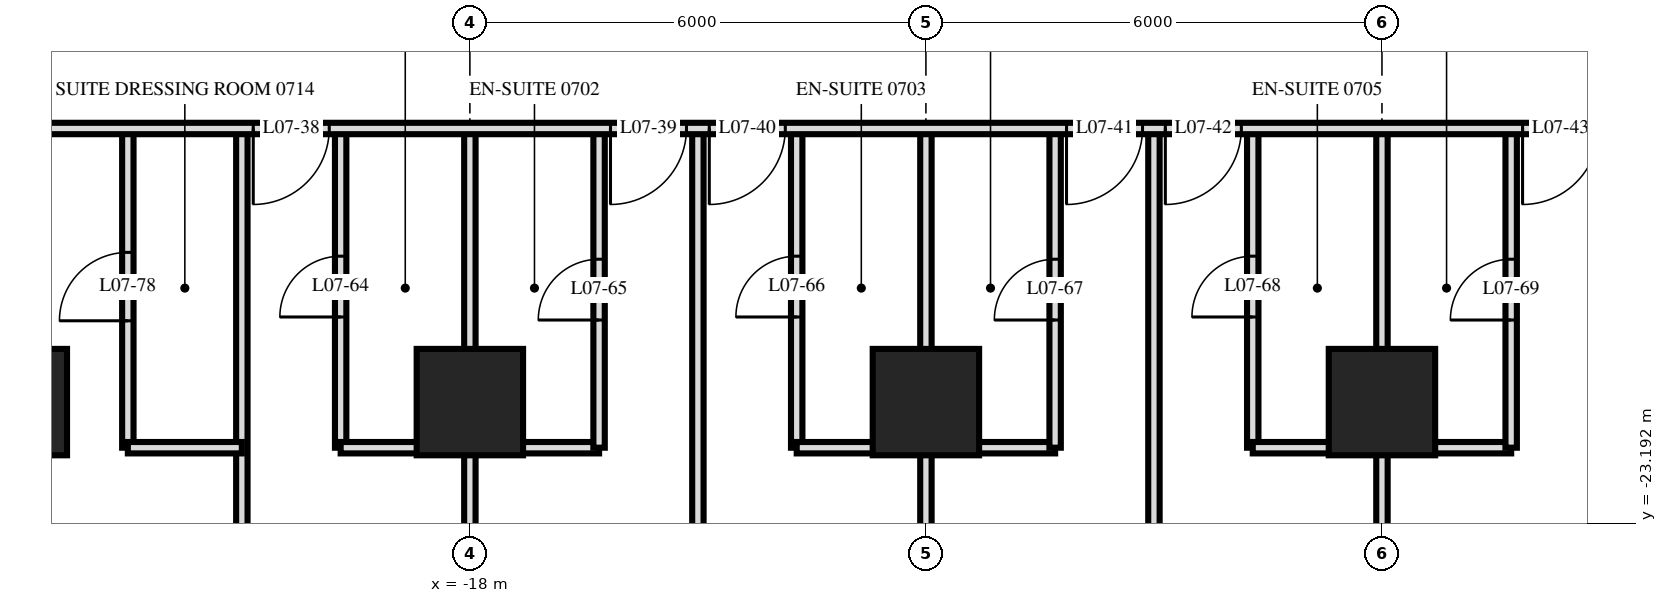
"""IFC4 building model, lengths in metres.
Left out: names, types, materials, properties, quantities, classifications, styles, units other than length and angle.
Written with IfcOpenShell. Run it as: python <this file> out.ifc"""

import sys

from ifc_helpers import new_model, si_unit, direction, frame, frame_2d, origin, origin_2d, place, context, subcontext, project, spatial, rectangle, extrude, element, fill, save


model = new_model("IFC4")
c1 = context("Model", 3, precision=1e-05, world=origin(), true_north=direction((0.0, 1.0)))
c2 = subcontext(c1, "Body", "Model", "MODEL_VIEW")
j1 = project(units=[si_unit("LENGTHUNIT", "METRE"), si_unit("PLANEANGLEUNIT", "RADIAN")], contexts=[c1])
p1 = place(None, origin())
s1 = spatial("IfcSite", under=j1, at=p1, CompositionType="ELEMENT")
p2 = place(p1, origin())
s2 = spatial("IfcBuilding", under=s1, at=p2, CompositionType="ELEMENT")
p3 = place(p2, frame((0.0, 0.0, 34.8)))
s3 = spatial("IfcBuildingStorey", under=s2, at=p3, CompositionType="ELEMENT", Elevation=34.8)
for number, where, z_axis, x_axis in (
    (1, (-24.0, -21.6, 0.0), (0.0, 0.0, 1.0), (1.0, 0.0, 0.0)),
    (2, (-18.0, -21.6, 0.0), (0.0, 0.0, 1.0), (1.0, 0.0, 0.0)),
    (3, (-12.0, -21.6, 0.0), (0.0, 0.0, 1.0), (1.0, 0.0, 0.0)),
    (4, (-6.0, -21.6, 0.0), (0.0, 0.0, 1.0), (1.0, 0.0, 0.0)),
):
    element("IfcColumn", number, at=place(p3, frame(where, z_axis=z_axis, x_axis=x_axis)), inside=s3, PredefinedType="COLUMN", context=c2, shape_type="SweptSolid", body=[
        extrude(rectangle(XDim=1.4, YDim=1.4, at=origin_2d()), origin(), (0.0, 0.0, 1.0), 3.6),
    ])
p4 = place(p3, frame((-4.3, -22.2, 0.0), z_axis=(0.0, 0.0, 1.0), x_axis=(0.0, 1.0, 0.0)))
e5 = element("IfcWall", 5, at=p4, inside=s3, PredefinedType="PARTITIONING", context=c2, shape_type="SweptSolid", body=[
    extrude(rectangle(XDim=4.2, YDim=0.15, at=frame_2d((2.1, 0.0))), origin(), (0.0, 0.0, 1.0), 3.32),
])
p5 = place(p4, frame((1.68, 0.0, 0.0)))
e6 = element("IfcOpeningElement", 6, at=p5, cuts=e5, PredefinedType="OPENING", context=c2, shape_type="SweptSolid", body=[
    extrude(rectangle(XDim=0.8, YDim=2.1, at=frame_2d((0.4, 1.05))), frame((0.0, 0.085, 0.0), z_axis=(0.0, -1.0, 0.0), x_axis=(1.0, 0.0, 0.0)), (0.0, 0.0, 1.0), 0.17),
])
p6 = place(p3, frame((-6.0, -29.22, 0.0), z_axis=(0.0, 0.0, 1.0), x_axis=(0.0, 1.0, 0.0)))
e7 = element("IfcWall", 7, at=p6, inside=s3, PredefinedType="PARTITIONING", context=c2, shape_type="SweptSolid", body=[
    extrude(rectangle(XDim=11.22, YDim=0.15, at=frame_2d((5.61, 0.0))), origin(), (0.0, 0.0, 1.0), 3.32),
])
p7 = place(p3, frame((-7.7, -22.2, 0.0), z_axis=(0.0, 0.0, 1.0), x_axis=(0.0, 1.0, 0.0)))
e8 = element("IfcWall", 8, at=p7, inside=s3, PredefinedType="PARTITIONING", context=c2, shape_type="SweptSolid", body=[
    extrude(rectangle(XDim=4.2, YDim=0.15, at=frame_2d((2.1, 0.0))), origin(), (0.0, 0.0, 1.0), 3.32),
])
p8 = place(p7, frame((1.72, 0.0, 0.0)))
e9 = element("IfcOpeningElement", 9, at=p8, cuts=e8, PredefinedType="OPENING", context=c2, shape_type="SweptSolid", body=[
    extrude(rectangle(XDim=0.8, YDim=2.1, at=frame_2d((0.4, 1.05))), frame((0.0, 0.085, 0.0), z_axis=(0.0, -1.0, 0.0), x_axis=(1.0, 0.0, 0.0)), (0.0, 0.0, 1.0), 0.17),
])
p9 = place(p3, frame((-9.0, -29.22, 0.0), z_axis=(0.0, 0.0, 1.0), x_axis=(0.0, 1.0, 0.0)))
e10 = element("IfcWall", 10, at=p9, inside=s3, PredefinedType="PARTITIONING", context=c2, shape_type="SweptSolid", body=[
    extrude(rectangle(XDim=11.22, YDim=0.15, at=frame_2d((5.61, 0.0))), origin(), (0.0, 0.0, 1.0), 3.32),
])
p10 = place(p3, frame((-10.3, -22.2, 0.0), z_axis=(0.0, 0.0, 1.0), x_axis=(0.0, 1.0, 0.0)))
e11 = element("IfcWall", 11, at=p10, inside=s3, PredefinedType="PARTITIONING", context=c2, shape_type="SweptSolid", body=[
    extrude(rectangle(XDim=4.2, YDim=0.15, at=frame_2d((2.1, 0.0))), origin(), (0.0, 0.0, 1.0), 3.32),
])
p11 = place(p10, frame((1.68, 0.0, 0.0)))
e12 = element("IfcOpeningElement", 12, at=p11, cuts=e11, PredefinedType="OPENING", context=c2, shape_type="SweptSolid", body=[
    extrude(rectangle(XDim=0.8, YDim=2.1, at=frame_2d((0.4, 1.05))), frame((0.0, 0.085, 0.0), z_axis=(0.0, -1.0, 0.0), x_axis=(1.0, 0.0, 0.0)), (0.0, 0.0, 1.0), 0.17),
])
p12 = place(p3, frame((-12.0, -29.22, 0.0), z_axis=(0.0, 0.0, 1.0), x_axis=(0.0, 1.0, 0.0)))
e13 = element("IfcWall", 13, at=p12, inside=s3, PredefinedType="PARTITIONING", context=c2, shape_type="SweptSolid", body=[
    extrude(rectangle(XDim=11.22, YDim=0.15, at=frame_2d((5.61, 0.0))), origin(), (0.0, 0.0, 1.0), 3.32),
])
p13 = place(p3, frame((-13.7, -22.2, 0.0), z_axis=(0.0, 0.0, 1.0), x_axis=(0.0, 1.0, 0.0)))
e14 = element("IfcWall", 14, at=p13, inside=s3, PredefinedType="PARTITIONING", context=c2, shape_type="SweptSolid", body=[
    extrude(rectangle(XDim=4.2, YDim=0.15, at=frame_2d((2.1, 0.0))), origin(), (0.0, 0.0, 1.0), 3.32),
])
p14 = place(p13, frame((1.72, 0.0, 0.0)))
e15 = element("IfcOpeningElement", 15, at=p14, cuts=e14, PredefinedType="OPENING", context=c2, shape_type="SweptSolid", body=[
    extrude(rectangle(XDim=0.8, YDim=2.1, at=frame_2d((0.4, 1.05))), frame((0.0, 0.085, 0.0), z_axis=(0.0, -1.0, 0.0), x_axis=(1.0, 0.0, 0.0)), (0.0, 0.0, 1.0), 0.17),
])
p15 = place(p3, frame((-15.0, -29.22, 0.0), z_axis=(0.0, 0.0, 1.0), x_axis=(0.0, 1.0, 0.0)))
e16 = element("IfcWall", 16, at=p15, inside=s3, PredefinedType="PARTITIONING", context=c2, shape_type="SweptSolid", body=[
    extrude(rectangle(XDim=11.22, YDim=0.15, at=frame_2d((5.61, 0.0))), origin(), (0.0, 0.0, 1.0), 3.32),
])
p16 = place(p3, frame((-16.3, -22.2, 0.0), z_axis=(0.0, 0.0, 1.0), x_axis=(0.0, 1.0, 0.0)))
e17 = element("IfcWall", 17, at=p16, inside=s3, PredefinedType="PARTITIONING", context=c2, shape_type="SweptSolid", body=[
    extrude(rectangle(XDim=4.2, YDim=0.15, at=frame_2d((2.1, 0.0))), origin(), (0.0, 0.0, 1.0), 3.32),
])
p17 = place(p16, frame((1.68, 0.0, 0.0)))
e18 = element("IfcOpeningElement", 18, at=p17, cuts=e17, PredefinedType="OPENING", context=c2, shape_type="SweptSolid", body=[
    extrude(rectangle(XDim=0.8, YDim=2.1, at=frame_2d((0.4, 1.05))), frame((0.0, 0.085, 0.0), z_axis=(0.0, -1.0, 0.0), x_axis=(1.0, 0.0, 0.0)), (0.0, 0.0, 1.0), 0.17),
])
p18 = place(p3, frame((-18.0, -29.22, 0.0), z_axis=(0.0, 0.0, 1.0), x_axis=(0.0, 1.0, 0.0)))
e19 = element("IfcWall", 19, at=p18, inside=s3, PredefinedType="PARTITIONING", context=c2, shape_type="SweptSolid", body=[
    extrude(rectangle(XDim=11.22, YDim=0.15, at=frame_2d((5.61, 0.0))), origin(), (0.0, 0.0, 1.0), 3.32),
])
p19 = place(p3, frame((-19.7, -22.2, 0.0), z_axis=(0.0, 0.0, 1.0), x_axis=(0.0, 1.0, 0.0)))
e20 = element("IfcWall", 20, at=p19, inside=s3, PredefinedType="PARTITIONING", context=c2, shape_type="SweptSolid", body=[
    extrude(rectangle(XDim=4.2, YDim=0.15, at=frame_2d((2.1, 0.0))), origin(), (0.0, 0.0, 1.0), 3.32),
])
p20 = place(p19, frame((1.72, 0.0, 0.0)))
e21 = element("IfcOpeningElement", 21, at=p20, cuts=e20, PredefinedType="OPENING", context=c2, shape_type="SweptSolid", body=[
    extrude(rectangle(XDim=0.8, YDim=2.1, at=frame_2d((0.4, 1.05))), frame((0.0, 0.085, 0.0), z_axis=(0.0, -1.0, 0.0), x_axis=(1.0, 0.0, 0.0)), (0.0, 0.0, 1.0), 0.17),
])
p21 = place(p3, frame((-21.0, -29.22, 0.0), z_axis=(0.0, 0.0, 1.0), x_axis=(0.0, 1.0, 0.0)))
e22 = element("IfcWall", 22, at=p21, inside=s3, PredefinedType="PARTITIONING", context=c2, shape_type="SweptSolid", body=[
    extrude(rectangle(XDim=11.22, YDim=0.15, at=frame_2d((5.61, 0.0))), origin(), (0.0, 0.0, 1.0), 3.32),
])
p22 = place(p3, frame((-22.5, -22.2, 0.0), z_axis=(0.0, 0.0, 1.0), x_axis=(0.0, 1.0, 0.0)))
e23 = element("IfcWall", 23, at=p22, inside=s3, PredefinedType="PARTITIONING", context=c2, shape_type="SweptSolid", body=[
    extrude(rectangle(XDim=4.2, YDim=0.15, at=frame_2d((2.1, 0.0))), origin(), (0.0, 0.0, 1.0), 3.32),
])
p23 = place(p22, frame((1.67, 0.0, 0.0)))
e24 = element("IfcOpeningElement", 24, at=p23, cuts=e23, PredefinedType="OPENING", context=c2, shape_type="SweptSolid", body=[
    extrude(rectangle(XDim=0.9, YDim=2.1, at=frame_2d((0.45, 1.05))), frame((0.0, 0.085, 0.0), z_axis=(0.0, -1.0, 0.0), x_axis=(1.0, 0.0, 0.0)), (0.0, 0.0, 1.0), 0.17),
])
p24 = place(p3, frame((-22.5, -22.2, 0.0), z_axis=(0.0, 0.0, 1.0), x_axis=(1.0, 0.0, 0.0)))
e25 = element("IfcWall", 25, at=p24, inside=s3, PredefinedType="PARTITIONING", context=c2, shape_type="SweptSolid", body=[
    extrude(rectangle(XDim=1.5, YDim=0.15, at=frame_2d((0.75, 0.0))), origin(), (0.0, 0.0, 1.0), 3.32),
])
for number, where, z_axis, x_axis in (
    (26, (-19.7, -22.2, 0.0), (0.0, 0.0, 1.0), (1.0, 0.0, 0.0)),
    (27, (-13.7, -22.2, 0.0), (0.0, 0.0, 1.0), (1.0, 0.0, 0.0)),
    (28, (-7.7, -22.2, 0.0), (0.0, 0.0, 1.0), (1.0, 0.0, 0.0)),
):
    element("IfcWall", number, at=place(p3, frame(where, z_axis=z_axis, x_axis=x_axis)), inside=s3, PredefinedType="PARTITIONING", context=c2, shape_type="SweptSolid", body=[
        extrude(rectangle(XDim=3.4, YDim=0.15, at=frame_2d((1.7, 0.0))), origin(), (0.0, 0.0, 1.0), 3.32),
    ])
p25 = place(p3, frame((-33.12, -18.0, 0.0), z_axis=(0.0, 0.0, 1.0), x_axis=(1.0, 0.0, 0.0)))
e29 = element("IfcWall", 29, at=p25, inside=s3, PredefinedType="PARTITIONING", context=c2, shape_type="SweptSolid", body=[
    extrude(rectangle(XDim=66.24, YDim=0.15, at=frame_2d((33.12, 0.0))), origin(), (0.0, 0.0, 1.0), 3.32),
])
p26 = place(p25, frame((12.27, 0.0, 0.0)))
e30 = element("IfcOpeningElement", 30, at=p26, cuts=e29, PredefinedType="OPENING", context=c2, shape_type="SweptSolid", body=[
    extrude(rectangle(XDim=1.0, YDim=2.1, at=frame_2d((0.5, 1.05))), frame((0.0, 0.085, 0.0), z_axis=(0.0, -1.0, 0.0), x_axis=(1.0, 0.0, 0.0)), (0.0, 0.0, 1.0), 0.17),
])
p27 = place(p25, frame((16.97, 0.0, 0.0)))
e31 = element("IfcOpeningElement", 31, at=p27, cuts=e29, PredefinedType="OPENING", context=c2, shape_type="SweptSolid", body=[
    extrude(rectangle(XDim=1.0, YDim=2.1, at=frame_2d((0.5, 1.05))), frame((0.0, 0.085, 0.0), z_axis=(0.0, -1.0, 0.0), x_axis=(1.0, 0.0, 0.0)), (0.0, 0.0, 1.0), 0.17),
])
p28 = place(p25, frame((18.27, 0.0, 0.0)))
e32 = element("IfcOpeningElement", 32, at=p28, cuts=e29, PredefinedType="OPENING", context=c2, shape_type="SweptSolid", body=[
    extrude(rectangle(XDim=1.0, YDim=2.1, at=frame_2d((0.5, 1.05))), frame((0.0, 0.085, 0.0), z_axis=(0.0, -1.0, 0.0), x_axis=(1.0, 0.0, 0.0)), (0.0, 0.0, 1.0), 0.17),
])
p29 = place(p25, frame((22.97, 0.0, 0.0)))
e33 = element("IfcOpeningElement", 33, at=p29, cuts=e29, PredefinedType="OPENING", context=c2, shape_type="SweptSolid", body=[
    extrude(rectangle(XDim=1.0, YDim=2.1, at=frame_2d((0.5, 1.05))), frame((0.0, 0.085, 0.0), z_axis=(0.0, -1.0, 0.0), x_axis=(1.0, 0.0, 0.0)), (0.0, 0.0, 1.0), 0.17),
])
p30 = place(p25, frame((24.27, 0.0, 0.0)))
e34 = element("IfcOpeningElement", 34, at=p30, cuts=e29, PredefinedType="OPENING", context=c2, shape_type="SweptSolid", body=[
    extrude(rectangle(XDim=1.0, YDim=2.1, at=frame_2d((0.5, 1.05))), frame((0.0, 0.085, 0.0), z_axis=(0.0, -1.0, 0.0), x_axis=(1.0, 0.0, 0.0)), (0.0, 0.0, 1.0), 0.17),
])
p31 = place(p25, frame((28.97, 0.0, 0.0)))
e35 = element("IfcOpeningElement", 35, at=p31, cuts=e29, PredefinedType="OPENING", context=c2, shape_type="SweptSolid", body=[
    extrude(rectangle(XDim=1.0, YDim=2.1, at=frame_2d((0.5, 1.05))), frame((0.0, 0.085, 0.0), z_axis=(0.0, -1.0, 0.0), x_axis=(1.0, 0.0, 0.0)), (0.0, 0.0, 1.0), 0.17),
])
p32 = place(p25, frame((30.27, 0.0, 0.0)))
e36 = element("IfcOpeningElement", 36, at=p32, cuts=e29, PredefinedType="OPENING", context=c2, shape_type="SweptSolid", body=[
    extrude(rectangle(XDim=1.0, YDim=2.1, at=frame_2d((0.5, 1.05))), frame((0.0, 0.085, 0.0), z_axis=(0.0, -1.0, 0.0), x_axis=(1.0, 0.0, 0.0)), (0.0, 0.0, 1.0), 0.17),
])
p33 = place(p25, frame((34.97, 0.0, 0.0)))
e37 = element("IfcOpeningElement", 37, at=p33, cuts=e29, PredefinedType="OPENING", context=c2, shape_type="SweptSolid", body=[
    extrude(rectangle(XDim=1.0, YDim=2.1, at=frame_2d((0.5, 1.05))), frame((0.0, 0.085, 0.0), z_axis=(0.0, -1.0, 0.0), x_axis=(1.0, 0.0, 0.0)), (0.0, 0.0, 1.0), 0.17),
])
p34 = place(p25, frame((37.27, 0.0, 0.0)))
e38 = element("IfcOpeningElement", 38, at=p34, cuts=e29, PredefinedType="OPENING", context=c2, shape_type="SweptSolid", body=[
    extrude(rectangle(XDim=1.0, YDim=2.1, at=frame_2d((0.5, 1.05))), frame((0.0, 0.085, 0.0), z_axis=(0.0, -1.0, 0.0), x_axis=(1.0, 0.0, 0.0)), (0.0, 0.0, 1.0), 0.17),
])
p35 = place(p25, frame((43.97, 0.0, 0.0)))
e39 = element("IfcOpeningElement", 39, at=p35, cuts=e29, PredefinedType="OPENING", context=c2, shape_type="SweptSolid", body=[
    extrude(rectangle(XDim=1.0, YDim=2.1, at=frame_2d((0.5, 1.05))), frame((0.0, 0.085, 0.0), z_axis=(0.0, -1.0, 0.0), x_axis=(1.0, 0.0, 0.0)), (0.0, 0.0, 1.0), 0.17),
])
p36 = place(p25, frame((45.27, 0.0, 0.0)))
e40 = element("IfcOpeningElement", 40, at=p36, cuts=e29, PredefinedType="OPENING", context=c2, shape_type="SweptSolid", body=[
    extrude(rectangle(XDim=1.0, YDim=2.1, at=frame_2d((0.5, 1.05))), frame((0.0, 0.085, 0.0), z_axis=(0.0, -1.0, 0.0), x_axis=(1.0, 0.0, 0.0)), (0.0, 0.0, 1.0), 0.17),
])
p37 = place(p25, frame((51.22, 0.0, 0.0)))
e41 = element("IfcOpeningElement", 41, at=p37, cuts=e29, PredefinedType="OPENING", context=c2, shape_type="SweptSolid", body=[
    extrude(rectangle(XDim=1.0, YDim=2.1, at=frame_2d((0.5, 1.05))), frame((0.0, 0.085, 0.0), z_axis=(0.0, -1.0, 0.0), x_axis=(1.0, 0.0, 0.0)), (0.0, 0.0, 1.0), 0.17),
])
p38 = place(p25, frame((54.27, 0.0, 0.0)))
e42 = element("IfcOpeningElement", 42, at=p38, cuts=e29, PredefinedType="OPENING", context=c2, shape_type="SweptSolid", body=[
    extrude(rectangle(XDim=1.0, YDim=2.1, at=frame_2d((0.5, 1.05))), frame((0.0, 0.085, 0.0), z_axis=(0.0, -1.0, 0.0), x_axis=(1.0, 0.0, 0.0)), (0.0, 0.0, 1.0), 0.17),
])
p39 = place(p25, frame((6.07, 0.0, 0.0)))
e43 = element("IfcOpeningElement", 43, at=p39, cuts=e29, PredefinedType="OPENING", context=c2, shape_type="SweptSolid", body=[
    extrude(rectangle(XDim=1.0, YDim=2.1, at=frame_2d((0.5, 1.05))), frame((0.0, 0.085, 0.0), z_axis=(0.0, -1.0, 0.0), x_axis=(1.0, 0.0, 0.0)), (0.0, 0.0, 1.0), 0.17),
])
p40 = place(p25, frame((63.37, 0.0, 0.0)))
e44 = element("IfcOpeningElement", 44, at=p40, cuts=e29, PredefinedType="OPENING", context=c2, shape_type="SweptSolid", body=[
    extrude(rectangle(XDim=1.0, YDim=2.1, at=frame_2d((0.5, 1.05))), frame((0.0, 0.085, 0.0), z_axis=(0.0, -1.0, 0.0), x_axis=(1.0, 0.0, 0.0)), (0.0, 0.0, 1.0), 0.17),
])
p41 = place(p26, frame((0.5, 0.0, 0.0), z_axis=(0.0, 0.0, 1.0), x_axis=(-1.0, 0.0, 0.0)))
e45 = element("IfcDoor", 45, at=p41, inside=s3, OperationType="SINGLE_SWING_LEFT", PredefinedType="DOOR", context=c2, shape_type="SweptSolid", body=[
    extrude(rectangle(XDim=1.0, YDim=2.1, at=frame_2d((0.0, 1.05))), frame((0.0, -0.025, 0.0), z_axis=(0.0, 1.0, 0.0), x_axis=(-1.0, 0.0, 0.0)), (0.0, 0.0, 1.0), 0.05),
])
fill(e30, e45)
p42 = place(p27, frame((0.5, 0.0, 0.0), z_axis=(0.0, 0.0, 1.0), x_axis=(-1.0, 0.0, 0.0)))
e46 = element("IfcDoor", 46, at=p42, inside=s3, OperationType="SINGLE_SWING_LEFT", PredefinedType="DOOR", context=c2, shape_type="SweptSolid", body=[
    extrude(rectangle(XDim=1.0, YDim=2.1, at=frame_2d((0.0, 1.05))), frame((0.0, -0.025, 0.0), z_axis=(0.0, 1.0, 0.0), x_axis=(-1.0, 0.0, 0.0)), (0.0, 0.0, 1.0), 0.05),
])
fill(e31, e46)
p43 = place(p28, frame((0.5, 0.0, 0.0), z_axis=(0.0, 0.0, 1.0), x_axis=(-1.0, 0.0, 0.0)))
e47 = element("IfcDoor", 47, at=p43, inside=s3, OperationType="SINGLE_SWING_LEFT", PredefinedType="DOOR", context=c2, shape_type="SweptSolid", body=[
    extrude(rectangle(XDim=1.0, YDim=2.1, at=frame_2d((0.0, 1.05))), frame((0.0, -0.025, 0.0), z_axis=(0.0, 1.0, 0.0), x_axis=(-1.0, 0.0, 0.0)), (0.0, 0.0, 1.0), 0.05),
])
fill(e32, e47)
p44 = place(p29, frame((0.5, 0.0, 0.0), z_axis=(0.0, 0.0, 1.0), x_axis=(-1.0, 0.0, 0.0)))
e48 = element("IfcDoor", 48, at=p44, inside=s3, OperationType="SINGLE_SWING_LEFT", PredefinedType="DOOR", context=c2, shape_type="SweptSolid", body=[
    extrude(rectangle(XDim=1.0, YDim=2.1, at=frame_2d((0.0, 1.05))), frame((0.0, -0.025, 0.0), z_axis=(0.0, 1.0, 0.0), x_axis=(-1.0, 0.0, 0.0)), (0.0, 0.0, 1.0), 0.05),
])
fill(e33, e48)
p45 = place(p30, frame((0.5, 0.0, 0.0), z_axis=(0.0, 0.0, 1.0), x_axis=(-1.0, 0.0, 0.0)))
e49 = element("IfcDoor", 49, at=p45, inside=s3, OperationType="SINGLE_SWING_LEFT", PredefinedType="DOOR", context=c2, shape_type="SweptSolid", body=[
    extrude(rectangle(XDim=1.0, YDim=2.1, at=frame_2d((0.0, 1.05))), frame((0.0, -0.025, 0.0), z_axis=(0.0, 1.0, 0.0), x_axis=(-1.0, 0.0, 0.0)), (0.0, 0.0, 1.0), 0.05),
])
fill(e34, e49)
p46 = place(p31, frame((0.5, 0.0, 0.0), z_axis=(0.0, 0.0, 1.0), x_axis=(-1.0, 0.0, 0.0)))
e50 = element("IfcDoor", 50, at=p46, inside=s3, OperationType="SINGLE_SWING_LEFT", PredefinedType="DOOR", context=c2, shape_type="SweptSolid", body=[
    extrude(rectangle(XDim=1.0, YDim=2.1, at=frame_2d((0.0, 1.05))), frame((0.0, -0.025, 0.0), z_axis=(0.0, 1.0, 0.0), x_axis=(-1.0, 0.0, 0.0)), (0.0, 0.0, 1.0), 0.05),
])
fill(e35, e50)
p47 = place(p20, origin())
e51 = element("IfcDoor", 51, at=p47, inside=s3, OperationType="SINGLE_SWING_RIGHT", PredefinedType="DOOR", context=c2, shape_type="SweptSolid", body=[
    extrude(rectangle(XDim=0.8, YDim=2.1, at=frame_2d((0.4, 1.05))), frame((0.0, 0.025, 0.0), z_axis=(0.0, -1.0, 0.0), x_axis=(1.0, 0.0, 0.0)), (0.0, 0.0, 1.0), 0.05),
])
fill(e21, e51)
p48 = place(p17, origin())
e52 = element("IfcDoor", 52, at=p48, inside=s3, OperationType="SINGLE_SWING_RIGHT", PredefinedType="DOOR", context=c2, shape_type="SweptSolid", body=[
    extrude(rectangle(XDim=0.8, YDim=2.1, at=frame_2d((0.4, 1.05))), frame((0.0, 0.025, 0.0), z_axis=(0.0, -1.0, 0.0), x_axis=(1.0, 0.0, 0.0)), (0.0, 0.0, 1.0), 0.05),
])
fill(e18, e52)
p49 = place(p14, origin())
e53 = element("IfcDoor", 53, at=p49, inside=s3, OperationType="SINGLE_SWING_RIGHT", PredefinedType="DOOR", context=c2, shape_type="SweptSolid", body=[
    extrude(rectangle(XDim=0.8, YDim=2.1, at=frame_2d((0.4, 1.05))), frame((0.0, 0.025, 0.0), z_axis=(0.0, -1.0, 0.0), x_axis=(1.0, 0.0, 0.0)), (0.0, 0.0, 1.0), 0.05),
])
fill(e15, e53)
p50 = place(p11, origin())
e54 = element("IfcDoor", 54, at=p50, inside=s3, OperationType="SINGLE_SWING_RIGHT", PredefinedType="DOOR", context=c2, shape_type="SweptSolid", body=[
    extrude(rectangle(XDim=0.8, YDim=2.1, at=frame_2d((0.4, 1.05))), frame((0.0, 0.025, 0.0), z_axis=(0.0, -1.0, 0.0), x_axis=(1.0, 0.0, 0.0)), (0.0, 0.0, 1.0), 0.05),
])
fill(e12, e54)
p51 = place(p8, origin())
e55 = element("IfcDoor", 55, at=p51, inside=s3, OperationType="SINGLE_SWING_RIGHT", PredefinedType="DOOR", context=c2, shape_type="SweptSolid", body=[
    extrude(rectangle(XDim=0.8, YDim=2.1, at=frame_2d((0.4, 1.05))), frame((0.0, 0.025, 0.0), z_axis=(0.0, -1.0, 0.0), x_axis=(1.0, 0.0, 0.0)), (0.0, 0.0, 1.0), 0.05),
])
fill(e9, e55)
p52 = place(p5, origin())
e56 = element("IfcDoor", 56, at=p52, inside=s3, OperationType="SINGLE_SWING_RIGHT", PredefinedType="DOOR", context=c2, shape_type="SweptSolid", body=[
    extrude(rectangle(XDim=0.8, YDim=2.1, at=frame_2d((0.4, 1.05))), frame((0.0, 0.025, 0.0), z_axis=(0.0, -1.0, 0.0), x_axis=(1.0, 0.0, 0.0)), (0.0, 0.0, 1.0), 0.05),
])
fill(e6, e56)
p53 = place(p23, origin())
e57 = element("IfcDoor", 57, at=p53, inside=s3, OperationType="SINGLE_SWING_RIGHT", PredefinedType="DOOR", context=c2, shape_type="SweptSolid", body=[
    extrude(rectangle(XDim=0.9, YDim=2.1, at=frame_2d((0.45, 1.05))), frame((0.0, 0.025, 0.0), z_axis=(0.0, -1.0, 0.0), x_axis=(1.0, 0.0, 0.0)), (0.0, 0.0, 1.0), 0.05),
])
fill(e24, e57)
save(model, sys.argv[1])
